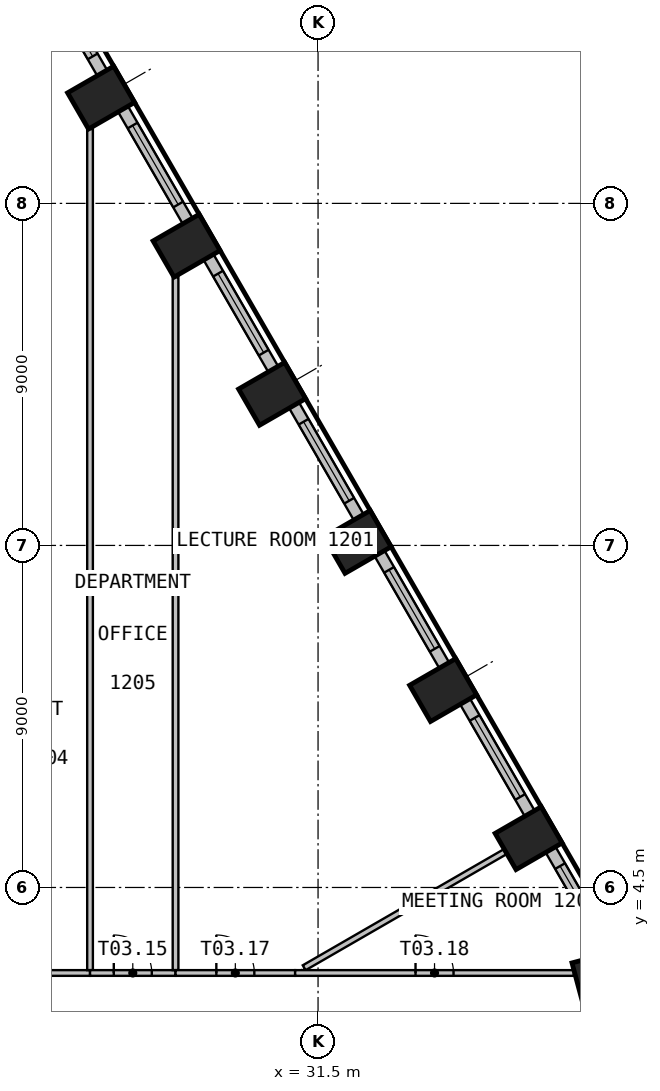
"""IFC4 building model, lengths in metres.
Left out: names, types, materials, properties, quantities, classifications, styles, units other than length and angle.
Written with IfcOpenShell. Run it as: python <this file> out.ifc"""

import sys

from ifc_helpers import new_model, si_unit, direction, frame, frame_2d, origin, origin_2d, place, context, subcontext, project, spatial, rectangle, extrude, element, fill, save


model = new_model("IFC4")
c1 = context("Model", 3, precision=1e-05, world=origin(), true_north=direction((0.0, 1.0)))
c2 = subcontext(c1, "Body", "Model", "MODEL_VIEW")
j1 = project(units=[si_unit("LENGTHUNIT", "METRE"), si_unit("PLANEANGLEUNIT", "RADIAN")], contexts=[c1])
p1 = place(None, origin())
s1 = spatial("IfcSite", under=j1, at=p1, CompositionType="ELEMENT")
p2 = place(p1, origin())
s2 = spatial("IfcBuilding", under=s1, at=p2, CompositionType="ELEMENT")
p3 = place(p2, frame((0.0, 0.0, 53.4)))
s3 = spatial("IfcBuildingStorey", under=s2, at=p3, CompositionType="ELEMENT", Elevation=53.4)
p4 = place(p3, frame((39.04, 2.02, 0.0), z_axis=(0.0, 0.0, 1.0), x_axis=(-0.258819045103, 0.965925826289, 0.0)))
e1 = element("IfcColumn", 1, at=p4, inside=s3, PredefinedType="COLUMN", context=c2, shape_type="SweptSolid", body=[
    extrude(rectangle(XDim=1.4, YDim=1.4, at=origin_2d()), origin(), (0.0, 0.0, 1.0), 3.525),
])
for number, where, z_axis, x_axis in (
    (2, (37.041, 5.797, 0.0), (0.0, 0.0, 1.0), (-0.5, 0.866, 0.0)),
    (3, (34.791, 9.694, 0.0), (0.0, 0.0, 1.0), (-0.5, 0.866, 0.0)),
    (4, (32.541, 13.591, 0.0), (0.0, 0.0, 1.0), (-0.5, 0.866, 0.0)),
    (5, (30.291, 17.489, 0.0), (0.0, 0.0, 1.0), (-0.5, 0.866, 0.0)),
    (6, (28.041, 21.385, 0.0), (0.0, 0.0, 1.0), (-0.5, 0.866, 0.0)),
    (7, (25.791, 25.283, 0.0), (0.0, 0.0, 1.0), (-0.5, 0.866, 0.0)),
):
    element("IfcColumn", number, at=place(p3, frame(where, z_axis=z_axis, x_axis=x_axis)), inside=s3, PredefinedType="COLUMN", context=c2, shape_type="SweptSolid", body=[
        extrude(rectangle(XDim=1.1, YDim=1.4, at=origin_2d()), origin(), (0.0, 0.0, 1.0), 3.525),
    ])
p5 = place(p3, frame((39.165, 2.819, 0.0), z_axis=(0.0, 0.0, 1.0), x_axis=(-0.49997090907, 0.866042198789, 0.0)))
e8 = element("IfcWall", 8, at=p5, inside=s3, PredefinedType="SOLIDWALL", context=c2, shape_type="SweptSolid", body=[
    extrude(rectangle(XDim=3.091, YDim=0.3, at=frame_2d((1.545, 0.0))), origin(), (0.0, 0.0, 1.0), 3.525),
])
p6 = place(p5, frame((0.191, 0.0, 0.9)))
e9 = element("IfcOpeningElement", 9, at=p6, cuts=e8, PredefinedType="OPENING", context=c2, shape_type="SweptSolid", body=[
    extrude(rectangle(XDim=2.4, YDim=2.1, at=frame_2d((1.2, 1.05))), frame((0.0, 0.16, 0.0), z_axis=(0.0, -1.0, 0.0), x_axis=(1.0, 0.0, 0.0)), (0.0, 0.0, 1.0), 0.32),
])
p7 = place(p3, frame((37.069, 6.449, 0.0), z_axis=(0.0, 0.0, 1.0), x_axis=(-0.499993955907, 0.866028893315, 0.0)))
e10 = element("IfcWall", 10, at=p7, inside=s3, PredefinedType="SOLIDWALL", context=c2, shape_type="SweptSolid", body=[
    extrude(rectangle(XDim=3.399, YDim=0.3, at=frame_2d((1.699, 0.0))), origin(), (0.0, 0.0, 1.0), 3.525),
])
p8 = place(p7, frame((0.5, 0.0, 0.9)))
e11 = element("IfcOpeningElement", 11, at=p8, cuts=e10, PredefinedType="OPENING", context=c2, shape_type="SweptSolid", body=[
    extrude(rectangle(XDim=2.4, YDim=2.1, at=frame_2d((1.2, 1.05))), frame((0.0, 0.16, 0.0), z_axis=(0.0, -1.0, 0.0), x_axis=(1.0, 0.0, 0.0)), (0.0, 0.0, 1.0), 0.32),
])
p9 = place(p3, frame((34.819, 10.346, 0.0), z_axis=(0.0, 0.0, 1.0), x_axis=(-0.499993955907, 0.866028893315, 0.0)))
e12 = element("IfcWall", 12, at=p9, inside=s3, PredefinedType="SOLIDWALL", context=c2, shape_type="SweptSolid", body=[
    extrude(rectangle(XDim=3.399, YDim=0.3, at=frame_2d((1.699, 0.0))), origin(), (0.0, 0.0, 1.0), 3.525),
])
p10 = place(p9, frame((0.5, 0.0, 0.9)))
e13 = element("IfcOpeningElement", 13, at=p10, cuts=e12, PredefinedType="OPENING", context=c2, shape_type="SweptSolid", body=[
    extrude(rectangle(XDim=2.4, YDim=2.1, at=frame_2d((1.2, 1.05))), frame((0.0, 0.16, 0.0), z_axis=(0.0, -1.0, 0.0), x_axis=(1.0, 0.0, 0.0)), (0.0, 0.0, 1.0), 0.32),
])
p11 = place(p3, frame((32.569, 14.243, 0.0), z_axis=(0.0, 0.0, 1.0), x_axis=(-0.499993955907, 0.866028893315, 0.0)))
e14 = element("IfcWall", 14, at=p11, inside=s3, PredefinedType="SOLIDWALL", context=c2, shape_type="SweptSolid", body=[
    extrude(rectangle(XDim=3.399, YDim=0.3, at=frame_2d((1.699, 0.0))), origin(), (0.0, 0.0, 1.0), 3.525),
])
p12 = place(p11, frame((0.5, 0.0, 0.9)))
e15 = element("IfcOpeningElement", 15, at=p12, cuts=e14, PredefinedType="OPENING", context=c2, shape_type="SweptSolid", body=[
    extrude(rectangle(XDim=2.4, YDim=2.1, at=frame_2d((1.2, 1.05))), frame((0.0, 0.16, 0.0), z_axis=(0.0, -1.0, 0.0), x_axis=(1.0, 0.0, 0.0)), (0.0, 0.0, 1.0), 0.32),
])
p13 = place(p3, frame((30.319, 18.14, 0.0), z_axis=(0.0, 0.0, 1.0), x_axis=(-0.499993955907, 0.866028893315, 0.0)))
e16 = element("IfcWall", 16, at=p13, inside=s3, PredefinedType="SOLIDWALL", context=c2, shape_type="SweptSolid", body=[
    extrude(rectangle(XDim=3.399, YDim=0.3, at=frame_2d((1.699, 0.0))), origin(), (0.0, 0.0, 1.0), 3.525),
])
p14 = place(p13, frame((0.5, 0.0, 0.9)))
e17 = element("IfcOpeningElement", 17, at=p14, cuts=e16, PredefinedType="OPENING", context=c2, shape_type="SweptSolid", body=[
    extrude(rectangle(XDim=2.4, YDim=2.1, at=frame_2d((1.2, 1.05))), frame((0.0, 0.16, 0.0), z_axis=(0.0, -1.0, 0.0), x_axis=(1.0, 0.0, 0.0)), (0.0, 0.0, 1.0), 0.32),
])
p15 = place(p3, frame((28.069, 22.037, 0.0), z_axis=(0.0, 0.0, 1.0), x_axis=(-0.499993955907, 0.866028893315, 0.0)))
e18 = element("IfcWall", 18, at=p15, inside=s3, PredefinedType="SOLIDWALL", context=c2, shape_type="SweptSolid", body=[
    extrude(rectangle(XDim=3.399, YDim=0.3, at=frame_2d((1.699, 0.0))), origin(), (0.0, 0.0, 1.0), 3.525),
])
p16 = place(p15, frame((0.5, 0.0, 0.9)))
e19 = element("IfcOpeningElement", 19, at=p16, cuts=e18, PredefinedType="OPENING", context=c2, shape_type="SweptSolid", body=[
    extrude(rectangle(XDim=2.4, YDim=2.1, at=frame_2d((1.2, 1.05))), frame((0.0, 0.16, 0.0), z_axis=(0.0, -1.0, 0.0), x_axis=(1.0, 0.0, 0.0)), (0.0, 0.0, 1.0), 0.32),
])
p17 = place(p3, frame((25.819, 25.934, 0.0), z_axis=(0.0, 0.0, 1.0), x_axis=(-0.499995950774, 0.866027741594, 0.0)))
e20 = element("IfcWall", 20, at=p17, inside=s3, PredefinedType="SOLIDWALL", context=c2, shape_type="SweptSolid", body=[
    extrude(rectangle(XDim=3.091, YDim=0.3, at=frame_2d((1.545, 0.0))), origin(), (0.0, 0.0, 1.0), 3.525),
])
p18 = place(p17, frame((0.5, 0.0, 0.9)))
e21 = element("IfcOpeningElement", 21, at=p18, cuts=e20, PredefinedType="OPENING", context=c2, shape_type="SweptSolid", body=[
    extrude(rectangle(XDim=2.4, YDim=2.1, at=frame_2d((1.2, 1.05))), frame((0.0, 0.16, 0.0), z_axis=(0.0, -1.0, 0.0), x_axis=(1.0, 0.0, 0.0)), (0.0, 0.0, 1.0), 0.32),
])
p19 = place(p3, frame((21.075, 2.25, 0.0), z_axis=(0.0, 0.0, 1.0), x_axis=(1.0, 0.0, 0.0)))
e22 = element("IfcWall", 22, at=p19, inside=s3, PredefinedType="PARTITIONING", context=c2, shape_type="SweptSolid", body=[
    extrude(rectangle(XDim=4.425, YDim=0.15, at=frame_2d((2.212, 0.0))), origin(), (0.0, 0.0, 1.0), 3.525),
])
p20 = place(p3, frame((25.5, 24.457, 0.0), z_axis=(0.0, 0.0, 1.0), x_axis=(0.0, -1.0, 0.0)))
e23 = element("IfcWall", 23, at=p20, inside=s3, PredefinedType="PARTITIONING", context=c2, shape_type="SweptSolid", body=[
    extrude(rectangle(XDim=22.132, YDim=0.15, at=frame_2d((11.066, 0.0))), origin(), (0.0, 0.0, 1.0), 3.525),
])
p21 = place(p3, frame((25.5, 2.25, 0.0), z_axis=(0.0, 0.0, 1.0), x_axis=(1.0, 0.0, 0.0)))
e24 = element("IfcWall", 24, at=p21, inside=s3, PredefinedType="PARTITIONING", context=c2, shape_type="SweptSolid", body=[
    extrude(rectangle(XDim=2.25, YDim=0.15, at=frame_2d((1.125, 0.0))), origin(), (0.0, 0.0, 1.0), 3.525),
])
p22 = place(p21, frame((0.625, 0.0, 0.0)))
e25 = element("IfcOpeningElement", 25, at=p22, cuts=e24, PredefinedType="OPENING", context=c2, shape_type="SweptSolid", body=[
    extrude(rectangle(XDim=1.0, YDim=2.1, at=frame_2d((0.5, 1.05))), frame((0.0, 0.085, 0.0), z_axis=(0.0, -1.0, 0.0), x_axis=(1.0, 0.0, 0.0)), (0.0, 0.0, 1.0), 0.17),
])
p23 = place(p3, frame((27.75, 20.56, 0.0), z_axis=(0.0, 0.0, 1.0), x_axis=(0.0, -1.0, 0.0)))
e26 = element("IfcWall", 26, at=p23, inside=s3, PredefinedType="PARTITIONING", context=c2, shape_type="SweptSolid", body=[
    extrude(rectangle(XDim=18.235, YDim=0.15, at=frame_2d((9.117, 0.0))), origin(), (0.0, 0.0, 1.0), 3.525),
])
p24 = place(p3, frame((27.75, 2.25, 0.0), z_axis=(0.0, 0.0, 1.0), x_axis=(1.0, 0.0, 0.0)))
e27 = element("IfcWall", 27, at=p24, inside=s3, PredefinedType="PARTITIONING", context=c2, shape_type="SweptSolid", body=[
    extrude(rectangle(XDim=3.147, YDim=0.15, at=frame_2d((1.573, 0.0))), origin(), (0.0, 0.0, 1.0), 3.525),
])
p25 = place(p24, frame((1.073, 0.0, 0.0)))
e28 = element("IfcOpeningElement", 28, at=p25, cuts=e27, PredefinedType="OPENING", context=c2, shape_type="SweptSolid", body=[
    extrude(rectangle(XDim=1.0, YDim=2.1, at=frame_2d((0.5, 1.05))), frame((0.0, 0.085, 0.0), z_axis=(0.0, -1.0, 0.0), x_axis=(1.0, 0.0, 0.0)), (0.0, 0.0, 1.0), 0.17),
])
p26 = place(p3, frame((36.417, 5.437, 0.0), z_axis=(0.0, 0.0, 1.0), x_axis=(-0.866007603866, -0.500030829096, 0.0)))
e29 = element("IfcWall", 29, at=p26, inside=s3, PredefinedType="PARTITIONING", context=c2, shape_type="SweptSolid", body=[
    extrude(rectangle(XDim=6.099, YDim=0.15, at=frame_2d((3.05, 0.0))), origin(), (0.0, 0.0, 1.0), 3.525),
])
p27 = place(p3, frame((30.897, 2.25, 0.0), z_axis=(0.0, 0.0, 1.0), x_axis=(1.0, 0.0, 0.0)))
e30 = element("IfcWall", 30, at=p27, inside=s3, PredefinedType="PARTITIONING", context=c2, shape_type="SweptSolid", body=[
    extrude(rectangle(XDim=7.336, YDim=0.15, at=frame_2d((3.668, 0.0))), origin(), (0.0, 0.0, 1.0), 3.525),
])
p28 = place(p27, frame((3.168, 0.0, 0.0)))
e31 = element("IfcOpeningElement", 31, at=p28, cuts=e30, PredefinedType="OPENING", context=c2, shape_type="SweptSolid", body=[
    extrude(rectangle(XDim=1.0, YDim=2.1, at=frame_2d((0.5, 1.05))), frame((0.0, 0.085, 0.0), z_axis=(0.0, -1.0, 0.0), x_axis=(1.0, 0.0, 0.0)), (0.0, 0.0, 1.0), 0.17),
])
p29 = place(p6, origin())
e32 = element("IfcWindow", 32, at=p29, inside=s3, PartitioningType="SINGLE_PANEL", PredefinedType="WINDOW", context=c2, shape_type="SweptSolid", body=[
    extrude(rectangle(XDim=2.4, YDim=2.1, at=frame_2d((1.2, 1.05))), frame((0.0, 0.03, 0.0), z_axis=(0.0, -1.0, 0.0), x_axis=(1.0, 0.0, 0.0)), (0.0, 0.0, 1.0), 0.06),
])
fill(e9, e32)
p30 = place(p8, origin())
e33 = element("IfcWindow", 33, at=p30, inside=s3, PartitioningType="SINGLE_PANEL", PredefinedType="WINDOW", context=c2, shape_type="SweptSolid", body=[
    extrude(rectangle(XDim=2.4, YDim=2.1, at=frame_2d((1.2, 1.05))), frame((0.0, 0.03, 0.0), z_axis=(0.0, -1.0, 0.0), x_axis=(1.0, 0.0, 0.0)), (0.0, 0.0, 1.0), 0.06),
])
fill(e11, e33)
p31 = place(p10, origin())
e34 = element("IfcWindow", 34, at=p31, inside=s3, PartitioningType="SINGLE_PANEL", PredefinedType="WINDOW", context=c2, shape_type="SweptSolid", body=[
    extrude(rectangle(XDim=2.4, YDim=2.1, at=frame_2d((1.2, 1.05))), frame((0.0, 0.03, 0.0), z_axis=(0.0, -1.0, 0.0), x_axis=(1.0, 0.0, 0.0)), (0.0, 0.0, 1.0), 0.06),
])
fill(e13, e34)
p32 = place(p12, origin())
e35 = element("IfcWindow", 35, at=p32, inside=s3, PartitioningType="SINGLE_PANEL", PredefinedType="WINDOW", context=c2, shape_type="SweptSolid", body=[
    extrude(rectangle(XDim=2.4, YDim=2.1, at=frame_2d((1.2, 1.05))), frame((0.0, 0.03, 0.0), z_axis=(0.0, -1.0, 0.0), x_axis=(1.0, 0.0, 0.0)), (0.0, 0.0, 1.0), 0.06),
])
fill(e15, e35)
p33 = place(p14, origin())
e36 = element("IfcWindow", 36, at=p33, inside=s3, PartitioningType="SINGLE_PANEL", PredefinedType="WINDOW", context=c2, shape_type="SweptSolid", body=[
    extrude(rectangle(XDim=2.4, YDim=2.1, at=frame_2d((1.2, 1.05))), frame((0.0, 0.03, 0.0), z_axis=(0.0, -1.0, 0.0), x_axis=(1.0, 0.0, 0.0)), (0.0, 0.0, 1.0), 0.06),
])
fill(e17, e36)
p34 = place(p16, origin())
e37 = element("IfcWindow", 37, at=p34, inside=s3, PartitioningType="SINGLE_PANEL", PredefinedType="WINDOW", context=c2, shape_type="SweptSolid", body=[
    extrude(rectangle(XDim=2.4, YDim=2.1, at=frame_2d((1.2, 1.05))), frame((0.0, 0.03, 0.0), z_axis=(0.0, -1.0, 0.0), x_axis=(1.0, 0.0, 0.0)), (0.0, 0.0, 1.0), 0.06),
])
fill(e19, e37)
p35 = place(p18, origin())
e38 = element("IfcWindow", 38, at=p35, inside=s3, PartitioningType="SINGLE_PANEL", PredefinedType="WINDOW", context=c2, shape_type="SweptSolid", body=[
    extrude(rectangle(XDim=2.4, YDim=2.1, at=frame_2d((1.2, 1.05))), frame((0.0, 0.03, 0.0), z_axis=(0.0, -1.0, 0.0), x_axis=(1.0, 0.0, 0.0)), (0.0, 0.0, 1.0), 0.06),
])
fill(e21, e38)
p36 = place(p22, origin())
e39 = element("IfcDoor", 39, at=p36, inside=s3, OperationType="SINGLE_SWING_RIGHT", PredefinedType="DOOR", context=c2, shape_type="SweptSolid", body=[
    extrude(rectangle(XDim=1.0, YDim=2.1, at=frame_2d((0.5, 1.05))), frame((0.0, 0.025, 0.0), z_axis=(0.0, -1.0, 0.0), x_axis=(1.0, 0.0, 0.0)), (0.0, 0.0, 1.0), 0.05),
])
fill(e25, e39)
p37 = place(p25, origin())
e40 = element("IfcDoor", 40, at=p37, inside=s3, OperationType="SINGLE_SWING_RIGHT", PredefinedType="DOOR", context=c2, shape_type="SweptSolid", body=[
    extrude(rectangle(XDim=1.0, YDim=2.1, at=frame_2d((0.5, 1.05))), frame((0.0, 0.025, 0.0), z_axis=(0.0, -1.0, 0.0), x_axis=(1.0, 0.0, 0.0)), (0.0, 0.0, 1.0), 0.05),
])
fill(e28, e40)
p38 = place(p28, origin())
e41 = element("IfcDoor", 41, at=p38, inside=s3, OperationType="SINGLE_SWING_RIGHT", PredefinedType="DOOR", context=c2, shape_type="SweptSolid", body=[
    extrude(rectangle(XDim=1.0, YDim=2.1, at=frame_2d((0.5, 1.05))), frame((0.0, 0.025, 0.0), z_axis=(0.0, -1.0, 0.0), x_axis=(1.0, 0.0, 0.0)), (0.0, 0.0, 1.0), 0.05),
])
fill(e31, e41)
save(model, sys.argv[1])
